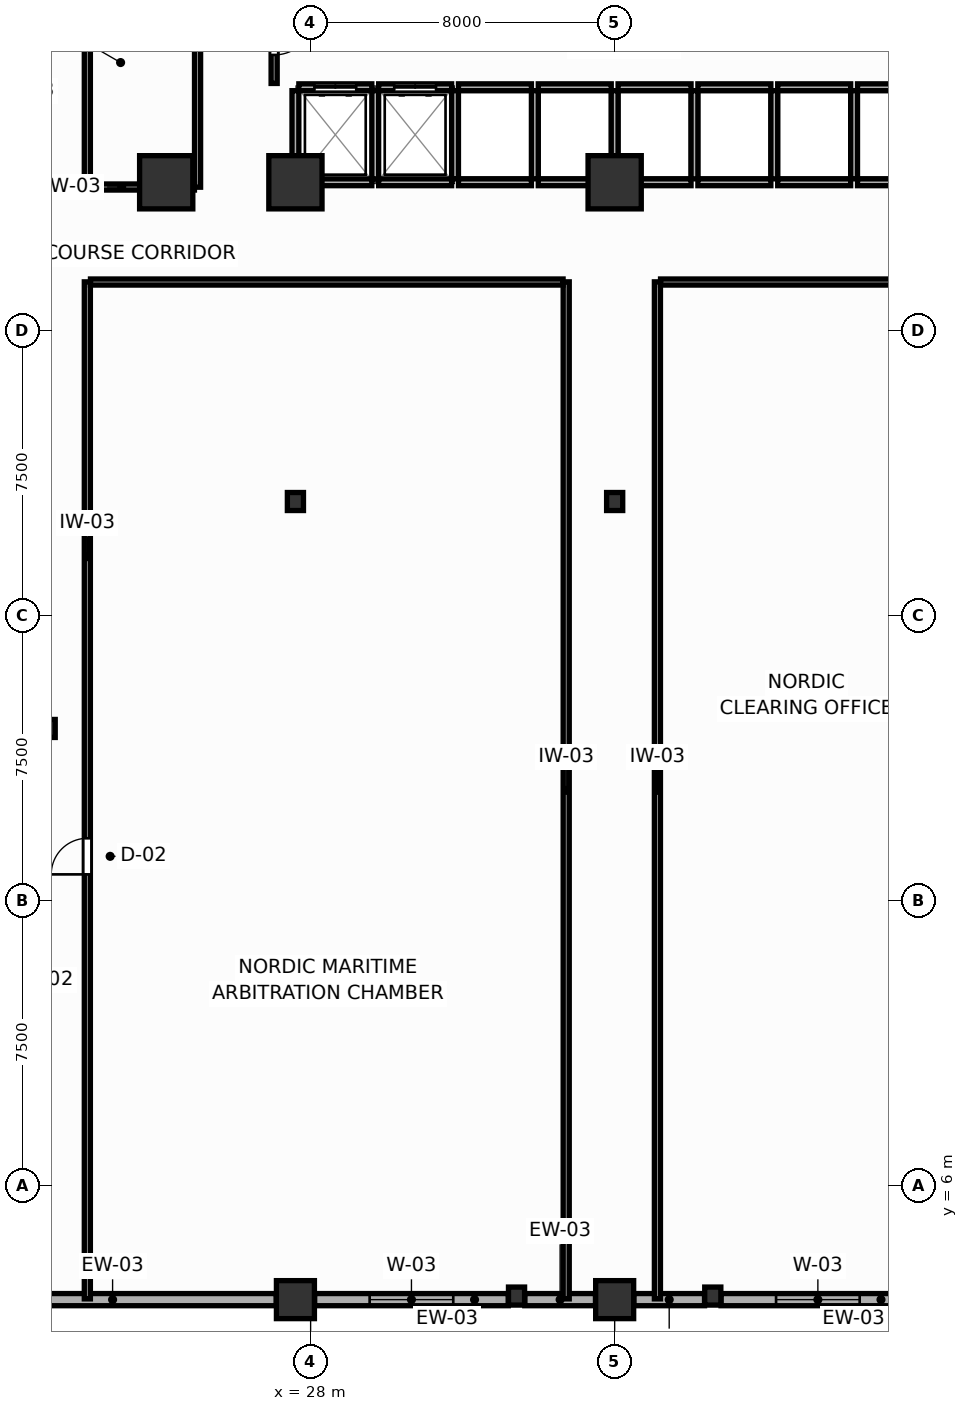
"""IFC4 building model, lengths in metres.
Left out: names, types, materials, properties, quantities, classifications, styles, units other than length and angle.
Written with IfcOpenShell. Run it as: python <this file> out.ifc"""

import sys

from ifc_helpers import new_model, si_unit, direction, frame, frame_2d, origin, origin_2d, place, context, subcontext, project, spatial, rectangle, i_section, extrude, source, transform, mapped, element, fill, save


model = new_model("IFC4")
c1 = context("Model", 3, precision=1e-05, world=origin(), true_north=direction((0.0, 1.0)))
c2 = subcontext(c1, "Body", "Model", "MODEL_VIEW")
j1 = project(units=[si_unit("LENGTHUNIT", "METRE"), si_unit("PLANEANGLEUNIT", "RADIAN")], contexts=[c1])
p1 = place(None, origin())
s1 = spatial("IfcSite", under=j1, at=p1, CompositionType="ELEMENT")
p2 = place(p1, origin())
s2 = spatial("IfcBuilding", under=s1, at=p2, CompositionType="ELEMENT")
p3 = place(p2, frame((0.0, 0.0, 14.4)))
s3 = spatial("IfcBuildingStorey", under=s2, at=p3, CompositionType="ELEMENT", Elevation=14.4)
m1 = source(origin(), c2, "Body", "SweptSolid", [
    extrude(rectangle(XDim=1.4, YDim=1.4, at=origin_2d()), origin(), (0.0, 0.0, 1.0), 4.8),
])
for number, where, z_axis, x_axis in (
    (1, (27.6, 32.4, 0.0), (0.0, 0.0, 1.0), (1.0, 0.0, 0.0)),
    (2, (36.0, 32.4, 0.0), (0.0, 0.0, 1.0), (1.0, 0.0, 0.0)),
    (3, (24.2, 32.4, 0.0), (0.0, 0.0, 1.0), (1.0, 0.0, 0.0)),
):
    element("IfcColumn", number, at=place(p3, frame(where, z_axis=z_axis, x_axis=x_axis)), inside=s3, PredefinedType="COLUMN", context=c2, shape_type="MappedRepresentation", body=[
        mapped(m1, transform((0.0, 0.0, 0.0), scale=1.0)),
    ])
m2 = source(origin(), c2, "Body", "SweptSolid", [
    extrude(i_section(OverallWidth=0.424, OverallDepth=0.474, WebThickness=0.045, FlangeThickness=0.072, FilletRadius=0.015, at=origin_2d()), origin(), (0.0, 0.0, 1.0), 4.8),
])
for number, where, z_axis, x_axis in (
    (4, (27.6, 24.0, 0.0), (0.0, 0.0, 1.0), (1.0, 0.0, 0.0)),
    (5, (36.0, 24.0, 0.0), (0.0, 0.0, 1.0), (1.0, 0.0, 0.0)),
):
    element("IfcColumn", number, at=place(p3, frame(where, z_axis=z_axis, x_axis=x_axis)), inside=s3, PredefinedType="COLUMN", context=c2, shape_type="MappedRepresentation", body=[
        mapped(m2, transform((0.0, 0.0, 0.0), scale=1.0)),
    ])
m3 = source(origin(), c2, "Body", "SweptSolid", [
    extrude(rectangle(XDim=1.0, YDim=1.0, at=origin_2d()), origin(), (0.0, 0.0, 1.0), 4.8),
])
for number, where, z_axis, x_axis in (
    (6, (27.6, 3.0, 0.0), (0.0, 0.0, 1.0), (1.0, 0.0, 0.0)),
    (7, (36.0, 3.0, 0.0), (0.0, 0.0, 1.0), (1.0, 0.0, 0.0)),
):
    element("IfcColumn", number, at=place(p3, frame(where, z_axis=z_axis, x_axis=x_axis)), inside=s3, PredefinedType="COLUMN", context=c2, shape_type="MappedRepresentation", body=[
        mapped(m3, transform((0.0, 0.0, 0.0), scale=1.0)),
    ])
for number, where, z_axis, x_axis in (
    (8, (21.068, 18.029, 0.0), (0.0, 0.0, 1.0), (1.0, 0.0, 0.0)),
    (9, (33.418, 3.094, 0.0), (0.0, 0.0, 1.0), (1.0, 0.0, 0.0)),
    (10, (38.582, 3.094, 0.0), (0.0, 0.0, 1.0), (1.0, 0.0, 0.0)),
):
    element("IfcColumn", number, at=place(p3, frame(where, z_axis=z_axis, x_axis=x_axis)), inside=s3, PredefinedType="COLUMN", context=c2, shape_type="MappedRepresentation", body=[
        mapped(m2, transform((0.0, 0.0, 0.0), scale=1.0)),
    ])
p4 = place(p3, frame((14.505, 3.0, 0.0), z_axis=(0.0, 0.0, 1.0), x_axis=(1.0, 0.0, 0.0)))
e11 = element("IfcWall", 11, at=p4, inside=s3, PredefinedType="SOLIDWALL", context=c2, shape_type="SweptSolid", body=[
    extrude(rectangle(XDim=12.59, YDim=0.32, at=frame_2d((6.295, 0.0))), origin(), (0.0, 0.0, 1.0), 3.82),
])
p5 = place(p4, frame((1.599, 0.0, 0.75)))
e12 = element("IfcOpeningElement", 12, at=p5, cuts=e11, PredefinedType="OPENING", context=c2, shape_type="SweptSolid", body=[
    extrude(rectangle(XDim=2.2, YDim=2.0, at=frame_2d((1.1, 1.0))), frame((0.0, 0.17, 0.0), z_axis=(0.0, -1.0, 0.0), x_axis=(1.0, 0.0, 0.0)), (0.0, 0.0, 1.0), 0.34),
])
p6 = place(p3, frame((28.105, 3.0, 0.0), z_axis=(0.0, 0.0, 1.0), x_axis=(1.0, 0.0, 0.0)))
e13 = element("IfcWall", 13, at=p6, inside=s3, PredefinedType="SOLIDWALL", context=c2, shape_type="SweptSolid", body=[
    extrude(rectangle(XDim=5.096, YDim=0.32, at=frame_2d((2.548, 0.0))), origin(), (0.0, 0.0, 1.0), 3.82),
])
p7 = place(p6, frame((1.448, 0.0, 0.75)))
e14 = element("IfcOpeningElement", 14, at=p7, cuts=e13, PredefinedType="OPENING", context=c2, shape_type="SweptSolid", body=[
    extrude(rectangle(XDim=2.2, YDim=2.0, at=frame_2d((1.1, 1.0))), frame((0.0, 0.17, 0.0), z_axis=(0.0, -1.0, 0.0), x_axis=(1.0, 0.0, 0.0)), (0.0, 0.0, 1.0), 0.34),
])
for number, where, z_axis, x_axis in (
    (15, (33.635, 3.0, 0.0), (0.0, 0.0, 1.0), (1.0, 0.0, 0.0)),
    (16, (36.505, 3.0, 0.0), (0.0, 0.0, 1.0), (1.0, 0.0, 0.0)),
):
    element("IfcWall", number, at=place(p3, frame(where, z_axis=z_axis, x_axis=x_axis)), inside=s3, PredefinedType="SOLIDWALL", context=c2, shape_type="SweptSolid", body=[
        extrude(rectangle(XDim=1.86, YDim=0.32, at=frame_2d((0.93, 0.0))), origin(), (0.0, 0.0, 1.0), 3.82),
    ])
p8 = place(p3, frame((38.799, 3.0, 0.0), z_axis=(0.0, 0.0, 1.0), x_axis=(1.0, 0.0, 0.0)))
e17 = element("IfcWall", 17, at=p8, inside=s3, PredefinedType="SOLIDWALL", context=c2, shape_type="SweptSolid", body=[
    extrude(rectangle(XDim=5.096, YDim=0.32, at=frame_2d((2.548, 0.0))), origin(), (0.0, 0.0, 1.0), 3.82),
])
p9 = place(p8, frame((1.448, 0.0, 0.75)))
e18 = element("IfcOpeningElement", 18, at=p9, cuts=e17, PredefinedType="OPENING", context=c2, shape_type="SweptSolid", body=[
    extrude(rectangle(XDim=2.2, YDim=2.0, at=frame_2d((1.1, 1.0))), frame((0.0, 0.17, 0.0), z_axis=(0.0, -1.0, 0.0), x_axis=(1.0, 0.0, 0.0)), (0.0, 0.0, 1.0), 0.34),
])
p10 = place(p3, frame((27.69, 34.9, 0.0), z_axis=(0.0, 0.0, 1.0), x_axis=(1.0, 0.0, 0.0)))
e19 = element("IfcWall", 19, at=p10, inside=s3, PredefinedType="PARTITIONING", context=c2, shape_type="SweptSolid", body=[
    extrude(rectangle(XDim=1.92, YDim=0.18, at=frame_2d((0.96, 0.0))), origin(), (0.0, 0.0, 1.0), 4.52),
])
p11 = place(p10, frame((0.41, 0.0, 0.0)))
e20 = element("IfcOpeningElement", 20, at=p11, cuts=e19, PredefinedType="OPENING", context=c2, shape_type="SweptSolid", body=[
    extrude(rectangle(XDim=1.1, YDim=2.1, at=frame_2d((0.55, 1.05))), frame((0.0, 0.1, 0.0), z_axis=(0.0, -1.0, 0.0), x_axis=(1.0, 0.0, 0.0)), (0.0, 0.0, 1.0), 0.2),
])
p12 = place(p3, frame((27.69, 32.4, 0.0), z_axis=(0.0, 0.0, 1.0), x_axis=(1.0, 0.0, 0.0)))
e21 = element("IfcWall", 21, at=p12, inside=s3, PredefinedType="PARTITIONING", context=c2, shape_type="SweptSolid", body=[
    extrude(rectangle(XDim=1.92, YDim=0.18, at=frame_2d((0.96, 0.0))), origin(), (0.0, 0.0, 1.0), 3.82),
])
p13 = place(p3, frame((27.6, 32.49, 0.0), z_axis=(0.0, 0.0, 1.0), x_axis=(0.0, 1.0, 0.0)))
e22 = element("IfcWall", 22, at=p13, inside=s3, PredefinedType="PARTITIONING", context=c2, shape_type="SweptSolid", body=[
    extrude(rectangle(XDim=2.32, YDim=0.18, at=frame_2d((1.16, 0.0))), origin(), (0.0, 0.0, 1.0), 4.52),
])
p14 = place(p3, frame((29.79, 34.9, 0.0), z_axis=(0.0, 0.0, 1.0), x_axis=(1.0, 0.0, 0.0)))
e23 = element("IfcWall", 23, at=p14, inside=s3, PredefinedType="PARTITIONING", context=c2, shape_type="SweptSolid", body=[
    extrude(rectangle(XDim=1.92, YDim=0.18, at=frame_2d((0.96, 0.0))), origin(), (0.0, 0.0, 1.0), 4.52),
])
p15 = place(p14, frame((0.41, 0.0, 0.0)))
e24 = element("IfcOpeningElement", 24, at=p15, cuts=e23, PredefinedType="OPENING", context=c2, shape_type="SweptSolid", body=[
    extrude(rectangle(XDim=1.1, YDim=2.1, at=frame_2d((0.55, 1.05))), frame((0.0, 0.1, 0.0), z_axis=(0.0, -1.0, 0.0), x_axis=(1.0, 0.0, 0.0)), (0.0, 0.0, 1.0), 0.2),
])
p16 = place(p3, frame((29.79, 32.4, 0.0), z_axis=(0.0, 0.0, 1.0), x_axis=(1.0, 0.0, 0.0)))
e25 = element("IfcWall", 25, at=p16, inside=s3, PredefinedType="PARTITIONING", context=c2, shape_type="SweptSolid", body=[
    extrude(rectangle(XDim=1.92, YDim=0.18, at=frame_2d((0.96, 0.0))), origin(), (0.0, 0.0, 1.0), 3.82),
])
p17 = place(p3, frame((29.7, 32.49, 0.0), z_axis=(0.0, 0.0, 1.0), x_axis=(0.0, 1.0, 0.0)))
e26 = element("IfcWall", 26, at=p17, inside=s3, PredefinedType="PARTITIONING", context=c2, shape_type="SweptSolid", body=[
    extrude(rectangle(XDim=2.32, YDim=0.18, at=frame_2d((1.16, 0.0))), origin(), (0.0, 0.0, 1.0), 4.52),
])
p18 = place(p3, frame((31.89, 34.9, 0.0), z_axis=(0.0, 0.0, 1.0), x_axis=(1.0, 0.0, 0.0)))
e27 = element("IfcWall", 27, at=p18, inside=s3, PredefinedType="PARTITIONING", context=c2, shape_type="SweptSolid", body=[
    extrude(rectangle(XDim=1.92, YDim=0.18, at=frame_2d((0.96, 0.0))), origin(), (0.0, 0.0, 1.0), 4.52),
])
p19 = place(p3, frame((31.89, 32.4, 0.0), z_axis=(0.0, 0.0, 1.0), x_axis=(1.0, 0.0, 0.0)))
e28 = element("IfcWall", 28, at=p19, inside=s3, PredefinedType="PARTITIONING", context=c2, shape_type="SweptSolid", body=[
    extrude(rectangle(XDim=1.92, YDim=0.18, at=frame_2d((0.96, 0.0))), origin(), (0.0, 0.0, 1.0), 3.82),
])
p20 = place(p3, frame((31.8, 32.49, 0.0), z_axis=(0.0, 0.0, 1.0), x_axis=(0.0, 1.0, 0.0)))
e29 = element("IfcWall", 29, at=p20, inside=s3, PredefinedType="PARTITIONING", context=c2, shape_type="SweptSolid", body=[
    extrude(rectangle(XDim=2.32, YDim=0.18, at=frame_2d((1.16, 0.0))), origin(), (0.0, 0.0, 1.0), 4.52),
])
p21 = place(p3, frame((33.99, 34.9, 0.0), z_axis=(0.0, 0.0, 1.0), x_axis=(1.0, 0.0, 0.0)))
e30 = element("IfcWall", 30, at=p21, inside=s3, PredefinedType="PARTITIONING", context=c2, shape_type="SweptSolid", body=[
    extrude(rectangle(XDim=1.92, YDim=0.18, at=frame_2d((0.96, 0.0))), origin(), (0.0, 0.0, 1.0), 4.52),
])
p22 = place(p3, frame((33.99, 32.4, 0.0), z_axis=(0.0, 0.0, 1.0), x_axis=(1.0, 0.0, 0.0)))
e31 = element("IfcWall", 31, at=p22, inside=s3, PredefinedType="PARTITIONING", context=c2, shape_type="SweptSolid", body=[
    extrude(rectangle(XDim=1.92, YDim=0.18, at=frame_2d((0.96, 0.0))), origin(), (0.0, 0.0, 1.0), 3.82),
])
p23 = place(p3, frame((33.9, 32.49, 0.0), z_axis=(0.0, 0.0, 1.0), x_axis=(0.0, 1.0, 0.0)))
e32 = element("IfcWall", 32, at=p23, inside=s3, PredefinedType="PARTITIONING", context=c2, shape_type="SweptSolid", body=[
    extrude(rectangle(XDim=2.32, YDim=0.18, at=frame_2d((1.16, 0.0))), origin(), (0.0, 0.0, 1.0), 4.52),
])
p24 = place(p3, frame((36.09, 34.9, 0.0), z_axis=(0.0, 0.0, 1.0), x_axis=(1.0, 0.0, 0.0)))
e33 = element("IfcWall", 33, at=p24, inside=s3, PredefinedType="PARTITIONING", context=c2, shape_type="SweptSolid", body=[
    extrude(rectangle(XDim=1.92, YDim=0.18, at=frame_2d((0.96, 0.0))), origin(), (0.0, 0.0, 1.0), 4.52),
])
p25 = place(p3, frame((36.09, 32.4, 0.0), z_axis=(0.0, 0.0, 1.0), x_axis=(1.0, 0.0, 0.0)))
e34 = element("IfcWall", 34, at=p25, inside=s3, PredefinedType="PARTITIONING", context=c2, shape_type="SweptSolid", body=[
    extrude(rectangle(XDim=1.92, YDim=0.18, at=frame_2d((0.96, 0.0))), origin(), (0.0, 0.0, 1.0), 3.82),
])
p26 = place(p3, frame((36.0, 32.49, 0.0), z_axis=(0.0, 0.0, 1.0), x_axis=(0.0, 1.0, 0.0)))
e35 = element("IfcWall", 35, at=p26, inside=s3, PredefinedType="PARTITIONING", context=c2, shape_type="SweptSolid", body=[
    extrude(rectangle(XDim=2.32, YDim=0.18, at=frame_2d((1.16, 0.0))), origin(), (0.0, 0.0, 1.0), 4.52),
])
p27 = place(p3, frame((38.19, 34.9, 0.0), z_axis=(0.0, 0.0, 1.0), x_axis=(1.0, 0.0, 0.0)))
e36 = element("IfcWall", 36, at=p27, inside=s3, PredefinedType="PARTITIONING", context=c2, shape_type="SweptSolid", body=[
    extrude(rectangle(XDim=1.92, YDim=0.18, at=frame_2d((0.96, 0.0))), origin(), (0.0, 0.0, 1.0), 4.52),
])
p28 = place(p3, frame((38.19, 32.4, 0.0), z_axis=(0.0, 0.0, 1.0), x_axis=(1.0, 0.0, 0.0)))
e37 = element("IfcWall", 37, at=p28, inside=s3, PredefinedType="PARTITIONING", context=c2, shape_type="SweptSolid", body=[
    extrude(rectangle(XDim=1.92, YDim=0.18, at=frame_2d((0.96, 0.0))), origin(), (0.0, 0.0, 1.0), 3.82),
])
p29 = place(p3, frame((38.1, 32.49, 0.0), z_axis=(0.0, 0.0, 1.0), x_axis=(0.0, 1.0, 0.0)))
e38 = element("IfcWall", 38, at=p29, inside=s3, PredefinedType="PARTITIONING", context=c2, shape_type="SweptSolid", body=[
    extrude(rectangle(XDim=2.32, YDim=0.18, at=frame_2d((1.16, 0.0))), origin(), (0.0, 0.0, 1.0), 4.52),
])
p30 = place(p3, frame((40.29, 34.9, 0.0), z_axis=(0.0, 0.0, 1.0), x_axis=(1.0, 0.0, 0.0)))
e39 = element("IfcWall", 39, at=p30, inside=s3, PredefinedType="PARTITIONING", context=c2, shape_type="SweptSolid", body=[
    extrude(rectangle(XDim=1.92, YDim=0.18, at=frame_2d((0.96, 0.0))), origin(), (0.0, 0.0, 1.0), 4.52),
])
p31 = place(p3, frame((40.29, 32.4, 0.0), z_axis=(0.0, 0.0, 1.0), x_axis=(1.0, 0.0, 0.0)))
e40 = element("IfcWall", 40, at=p31, inside=s3, PredefinedType="PARTITIONING", context=c2, shape_type="SweptSolid", body=[
    extrude(rectangle(XDim=1.92, YDim=0.18, at=frame_2d((0.96, 0.0))), origin(), (0.0, 0.0, 1.0), 3.82),
])
p32 = place(p3, frame((40.2, 32.49, 0.0), z_axis=(0.0, 0.0, 1.0), x_axis=(0.0, 1.0, 0.0)))
e41 = element("IfcWall", 41, at=p32, inside=s3, PredefinedType="PARTITIONING", context=c2, shape_type="SweptSolid", body=[
    extrude(rectangle(XDim=2.32, YDim=0.18, at=frame_2d((1.16, 0.0))), origin(), (0.0, 0.0, 1.0), 4.52),
])
p33 = place(p3, frame((42.39, 34.9, 0.0), z_axis=(0.0, 0.0, 1.0), x_axis=(1.0, 0.0, 0.0)))
e42 = element("IfcWall", 42, at=p33, inside=s3, PredefinedType="PARTITIONING", context=c2, shape_type="SweptSolid", body=[
    extrude(rectangle(XDim=1.92, YDim=0.18, at=frame_2d((0.96, 0.0))), origin(), (0.0, 0.0, 1.0), 4.52),
])
p34 = place(p3, frame((42.39, 32.4, 0.0), z_axis=(0.0, 0.0, 1.0), x_axis=(1.0, 0.0, 0.0)))
e43 = element("IfcWall", 43, at=p34, inside=s3, PredefinedType="PARTITIONING", context=c2, shape_type="SweptSolid", body=[
    extrude(rectangle(XDim=1.92, YDim=0.18, at=frame_2d((0.96, 0.0))), origin(), (0.0, 0.0, 1.0), 3.82),
])
p35 = place(p3, frame((42.3, 32.49, 0.0), z_axis=(0.0, 0.0, 1.0), x_axis=(0.0, 1.0, 0.0)))
e44 = element("IfcWall", 44, at=p35, inside=s3, PredefinedType="PARTITIONING", context=c2, shape_type="SweptSolid", body=[
    extrude(rectangle(XDim=2.32, YDim=0.18, at=frame_2d((1.16, 0.0))), origin(), (0.0, 0.0, 1.0), 4.52),
])
p36 = place(p3, frame((27.04, 35.0, 0.0), z_axis=(0.0, 0.0, 1.0), x_axis=(0.0, 1.0, 0.0)))
e45 = element("IfcWall", 45, at=p36, inside=s3, PredefinedType="PARTITIONING", context=c2, shape_type="SweptSolid", body=[
    extrude(rectangle(XDim=2.65, YDim=0.16, at=frame_2d((1.325, 0.0))), origin(), (0.0, 0.0, 1.0), 4.52),
])
p37 = place(p36, frame((0.75, 0.0, 0.0)))
e46 = element("IfcOpeningElement", 46, at=p37, cuts=e45, PredefinedType="OPENING", context=c2, shape_type="SweptSolid", body=[
    extrude(rectangle(XDim=1.05, YDim=2.1, at=frame_2d((0.525, 1.05))), frame((0.0, 0.09, 0.0), z_axis=(0.0, -1.0, 0.0), x_axis=(1.0, 0.0, 0.0)), (0.0, 0.0, 1.0), 0.18),
])
p38 = place(p3, frame((37.125, 3.02, 0.0), z_axis=(0.0, 0.0, 1.0), x_axis=(0.0, 1.0, 0.0)))
e47 = element("IfcWall", 47, at=p38, inside=s3, PredefinedType="PARTITIONING", context=c2, shape_type="SweptSolid", body=[
    extrude(rectangle(XDim=26.76, YDim=0.16, at=frame_2d((13.38, 0.0))), origin(), (0.0, 0.0, 1.0), 4.52),
])
p39 = place(p3, frame((22.125, 3.02, 0.0), z_axis=(0.0, 0.0, 1.0), x_axis=(0.0, 1.0, 0.0)))
e48 = element("IfcWall", 48, at=p39, inside=s3, PredefinedType="PARTITIONING", context=c2, shape_type="SweptSolid", body=[
    extrude(rectangle(XDim=26.76, YDim=0.16, at=frame_2d((13.38, 0.0))), origin(), (0.0, 0.0, 1.0), 4.52),
])
p40 = place(p39, frame((11.169, 0.0, 0.0)))
e49 = element("IfcOpeningElement", 49, at=p40, cuts=e48, PredefinedType="OPENING", context=c2, shape_type="SweptSolid", body=[
    extrude(rectangle(XDim=0.95, YDim=2.05, at=frame_2d((0.475, 1.025))), frame((0.0, 0.09, 0.0), z_axis=(0.0, -1.0, 0.0), x_axis=(1.0, 0.0, 0.0)), (0.0, 0.0, 1.0), 0.18),
])
p41 = place(p3, frame((34.725, 3.02, 0.0), z_axis=(0.0, 0.0, 1.0), x_axis=(0.0, 1.0, 0.0)))
e50 = element("IfcWall", 50, at=p41, inside=s3, PredefinedType="PARTITIONING", context=c2, shape_type="SweptSolid", body=[
    extrude(rectangle(XDim=26.76, YDim=0.16, at=frame_2d((13.38, 0.0))), origin(), (0.0, 0.0, 1.0), 4.52),
])
p42 = place(p3, frame((22.125, 32.27, 0.0), z_axis=(0.0, 0.0, 1.0), x_axis=(0.0, 1.0, 0.0)))
e51 = element("IfcWall", 51, at=p42, inside=s3, PredefinedType="PARTITIONING", context=c2, shape_type="SweptSolid", body=[
    extrude(rectangle(XDim=26.71, YDim=0.16, at=frame_2d((13.355, 0.0))), origin(), (0.0, 0.0, 1.0), 4.52),
])
p43 = place(p42, frame((5.438, 0.0, 0.0)))
e52 = element("IfcOpeningElement", 52, at=p43, cuts=e51, PredefinedType="OPENING", context=c2, shape_type="SweptSolid", body=[
    extrude(rectangle(XDim=0.95, YDim=2.05, at=frame_2d((0.475, 1.025))), frame((0.0, 0.09, 0.0), z_axis=(0.0, -1.0, 0.0), x_axis=(1.0, 0.0, 0.0)), (0.0, 0.0, 1.0), 0.18),
])
p44 = place(p42, frame((18.79, 0.0, 0.0)))
e53 = element("IfcOpeningElement", 53, at=p44, cuts=e51, PredefinedType="OPENING", context=c2, shape_type="SweptSolid", body=[
    extrude(rectangle(XDim=0.95, YDim=2.05, at=frame_2d((0.475, 1.025))), frame((0.0, 0.09, 0.0), z_axis=(0.0, -1.0, 0.0), x_axis=(1.0, 0.0, 0.0)), (0.0, 0.0, 1.0), 0.18),
])
p45 = place(p3, frame((25.025, 32.27, 0.0), z_axis=(0.0, 0.0, 1.0), x_axis=(0.0, 1.0, 0.0)))
e54 = element("IfcWall", 54, at=p45, inside=s3, PredefinedType="PARTITIONING", context=c2, shape_type="SweptSolid", body=[
    extrude(rectangle(XDim=26.71, YDim=0.16, at=frame_2d((13.355, 0.0))), origin(), (0.0, 0.0, 1.0), 4.52),
])
p46 = place(p3, frame((22.207, 29.775, 0.0), z_axis=(0.0, 0.0, 1.0), x_axis=(1.0, 0.0, 0.0)))
e55 = element("IfcWall", 55, at=p46, inside=s3, PredefinedType="PARTITIONING", context=c2, shape_type="SweptSolid", body=[
    extrude(rectangle(XDim=12.436, YDim=0.16, at=frame_2d((6.218, 0.0))), origin(), (0.0, 0.0, 1.0), 4.52),
])
p47 = place(p3, frame((37.207, 29.775, 0.0), z_axis=(0.0, 0.0, 1.0), x_axis=(1.0, 0.0, 0.0)))
e56 = element("IfcWall", 56, at=p47, inside=s3, PredefinedType="PARTITIONING", context=c2, shape_type="SweptSolid", body=[
    extrude(rectangle(XDim=7.676, YDim=0.16, at=frame_2d((3.838, 0.0))), origin(), (0.0, 0.0, 1.0), 4.52),
])
p48 = place(p3, frame((22.207, 32.275, 0.0), z_axis=(0.0, 0.0, 1.0), x_axis=(1.0, 0.0, 0.0)))
e57 = element("IfcWall", 57, at=p48, inside=s3, PredefinedType="PARTITIONING", context=c2, shape_type="SweptSolid", body=[
    extrude(rectangle(XDim=2.736, YDim=0.16, at=frame_2d((1.368, 0.0))), origin(), (0.0, 0.0, 1.0), 3.82),
])
p49 = place(p7, origin())
e58 = element("IfcWindow", 58, at=p49, inside=s3, PartitioningType="SINGLE_PANEL", PredefinedType="WINDOW", context=c2, shape_type="SweptSolid", body=[
    extrude(rectangle(XDim=2.2, YDim=2.0, at=frame_2d((1.1, 1.0))), frame((0.0, 0.03, 0.0), z_axis=(0.0, -1.0, 0.0), x_axis=(1.0, 0.0, 0.0)), (0.0, 0.0, 1.0), 0.06),
])
fill(e14, e58)
p50 = place(p9, origin())
e59 = element("IfcWindow", 59, at=p50, inside=s3, PartitioningType="SINGLE_PANEL", PredefinedType="WINDOW", context=c2, shape_type="SweptSolid", body=[
    extrude(rectangle(XDim=2.2, YDim=2.0, at=frame_2d((1.1, 1.0))), frame((0.0, 0.03, 0.0), z_axis=(0.0, -1.0, 0.0), x_axis=(1.0, 0.0, 0.0)), (0.0, 0.0, 1.0), 0.06),
])
fill(e18, e59)
p51 = place(p11, origin())
e60 = element("IfcDoor", 60, at=p51, inside=s3, OperationType="DOUBLE_DOOR_SLIDING", PredefinedType="DOOR", context=c2, shape_type="SweptSolid", body=[
    extrude(rectangle(XDim=1.1, YDim=2.1, at=frame_2d((0.55, 1.05))), frame((0.0, 0.025, 0.0), z_axis=(0.0, -1.0, 0.0), x_axis=(1.0, 0.0, 0.0)), (0.0, 0.0, 1.0), 0.05),
])
fill(e20, e60)
p52 = place(p15, origin())
e61 = element("IfcDoor", 61, at=p52, inside=s3, OperationType="DOUBLE_DOOR_SLIDING", PredefinedType="DOOR", context=c2, shape_type="SweptSolid", body=[
    extrude(rectangle(XDim=1.1, YDim=2.1, at=frame_2d((0.55, 1.05))), frame((0.0, 0.025, 0.0), z_axis=(0.0, -1.0, 0.0), x_axis=(1.0, 0.0, 0.0)), (0.0, 0.0, 1.0), 0.05),
])
fill(e24, e61)
p53 = place(p37, frame((1.05, 0.0, 0.0), z_axis=(0.0, 0.0, 1.0), x_axis=(-1.0, 0.0, 0.0)))
e62 = element("IfcDoor", 62, at=p53, inside=s3, OperationType="SINGLE_SWING_LEFT", PredefinedType="DOOR", context=c2, shape_type="SweptSolid", body=[
    extrude(rectangle(XDim=1.05, YDim=2.1, at=frame_2d((0.525, 1.05))), frame((0.0, 0.025, 0.0), z_axis=(0.0, -1.0, 0.0), x_axis=(1.0, 0.0, 0.0)), (0.0, 0.0, 1.0), 0.05),
])
fill(e46, e62)
p54 = place(p40, origin())
e63 = element("IfcDoor", 63, at=p54, inside=s3, OperationType="SINGLE_SWING_LEFT", PredefinedType="DOOR", context=c2, shape_type="SweptSolid", body=[
    extrude(rectangle(XDim=0.95, YDim=2.05, at=frame_2d((0.475, 1.025))), frame((0.0, 0.025, 0.0), z_axis=(0.0, -1.0, 0.0), x_axis=(1.0, 0.0, 0.0)), (0.0, 0.0, 1.0), 0.05),
])
fill(e49, e63)
save(model, sys.argv[1])
